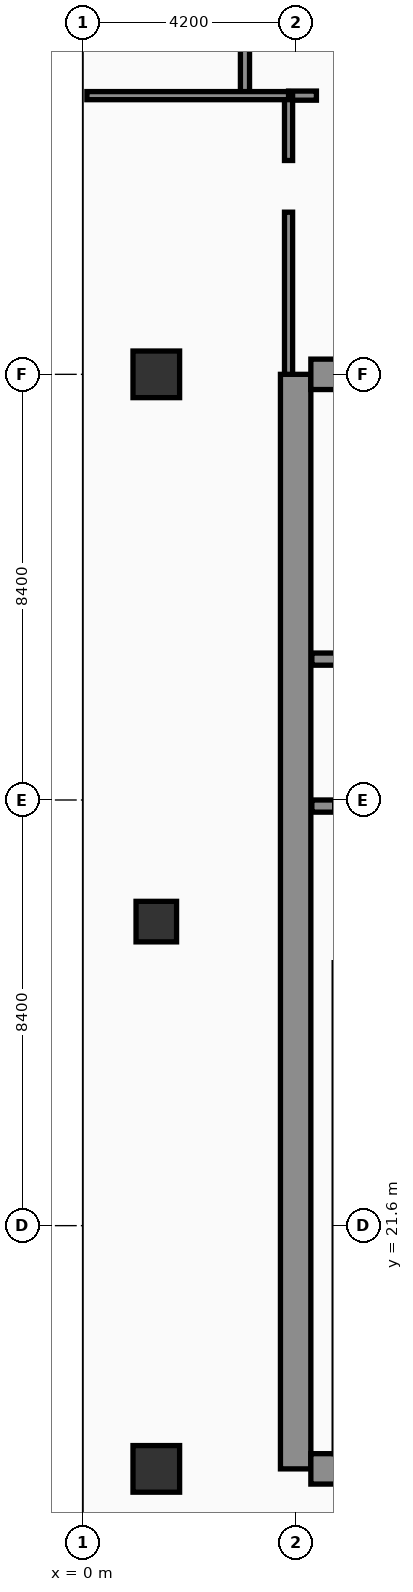
"""IFC4 building model, lengths in metres.
Left out: names, types, materials, properties, quantities, classifications, styles, units other than length and angle.
Written with IfcOpenShell. Run it as: python <this file> out.ifc"""

import sys

from ifc_helpers import new_model, si_unit, direction, frame, frame_2d, origin, origin_2d, place, context, subcontext, project, spatial, rectangle, extrude, element, fill, save


model = new_model("IFC4")
c1 = context("Model", 3, precision=1e-05, world=origin(), true_north=direction((0.0, 1.0)))
c2 = subcontext(c1, "Body", "Model", "MODEL_VIEW")
j1 = project(units=[si_unit("LENGTHUNIT", "METRE"), si_unit("PLANEANGLEUNIT", "RADIAN")], contexts=[c1])
p1 = place(None, origin())
s1 = spatial("IfcSite", under=j1, at=p1, CompositionType="ELEMENT")
p2 = place(p1, origin())
s2 = spatial("IfcBuilding", under=s1, at=p2, CompositionType="ELEMENT")
p3 = place(p2, frame((0.0, 0.0, 311.5)))
s3 = spatial("IfcBuildingStorey", under=s2, at=p3, CompositionType="ELEMENT", Elevation=311.5)
p4 = place(p3, frame((4.2, 16.8, 0.0), z_axis=(0.0, 0.0, 1.0), x_axis=(0.0, 1.0, 0.0)))
e1 = element("IfcWall", 1, at=p4, inside=s3, PredefinedType="SHEAR", context=c2, shape_type="SweptSolid", body=[
    extrude(rectangle(XDim=21.6, YDim=0.6, at=frame_2d((10.8, 0.0))), origin(), (0.0, 0.0, 1.0), 4.26),
])
p5 = place(p3, frame((4.5, 38.4, 0.0), z_axis=(0.0, 0.0, 1.0), x_axis=(1.0, 0.0, 0.0)))
e2 = element("IfcWall", 2, at=p5, inside=s3, PredefinedType="SHEAR", context=c2, shape_type="SweptSolid", body=[
    extrude(rectangle(XDim=10.2, YDim=0.6, at=frame_2d((5.1, 0.0))), origin(), (0.0, 0.0, 1.0), 4.26),
])
p6 = place(p5, frame((5.8, 0.0, 0.0)))
e3 = element("IfcOpeningElement", 3, at=p6, cuts=e2, PredefinedType="OPENING", context=c2, shape_type="SweptSolid", body=[
    extrude(rectangle(XDim=1.1, YDim=2.2, at=frame_2d((0.55, 1.1))), frame((0.0, 0.31, 0.0), z_axis=(0.0, -1.0, 0.0), x_axis=(1.0, 0.0, 0.0)), (0.0, 0.0, 1.0), 0.62),
])
p7 = place(p3, frame((4.5, 16.8, 0.0), z_axis=(0.0, 0.0, 1.0), x_axis=(1.0, 0.0, 0.0)))
e4 = element("IfcWall", 4, at=p7, inside=s3, PredefinedType="SHEAR", context=c2, shape_type="SweptSolid", body=[
    extrude(rectangle(XDim=10.2, YDim=0.6, at=frame_2d((5.1, 0.0))), origin(), (0.0, 0.0, 1.0), 4.26),
])
p8 = place(p3, frame((1.45, 16.8, 0.0), z_axis=(0.0, 0.0, 1.0), x_axis=(1.0, 0.0, 0.0)))
e5 = element("IfcColumn", 5, at=p8, inside=s3, PredefinedType="COLUMN", context=c2, shape_type="SweptSolid", body=[
    extrude(rectangle(XDim=0.92, YDim=0.92, at=origin_2d()), origin(), (0.0, 0.0, 1.0), 4.26),
])
p9 = place(p3, frame((1.45, 27.6, 0.0), z_axis=(0.0, 0.0, 1.0), x_axis=(1.0, 0.0, 0.0)))
e6 = element("IfcColumn", 6, at=p9, inside=s3, PredefinedType="COLUMN", context=c2, shape_type="SweptSolid", body=[
    extrude(rectangle(XDim=0.8, YDim=0.8, at=origin_2d()), origin(), (0.0, 0.0, 1.0), 4.26),
])
p10 = place(p3, frame((1.45, 38.4, 0.0), z_axis=(0.0, 0.0, 1.0), x_axis=(1.0, 0.0, 0.0)))
e7 = element("IfcColumn", 7, at=p10, inside=s3, PredefinedType="COLUMN", context=c2, shape_type="SweptSolid", body=[
    extrude(rectangle(XDim=0.92, YDim=0.92, at=origin_2d()), origin(), (0.0, 0.0, 1.0), 4.26),
])
p11 = place(p3, frame((4.52, 29.88, 0.0), z_axis=(0.0, 0.0, 1.0), x_axis=(1.0, 0.0, 0.0)))
e8 = element("IfcWall", 8, at=p11, inside=s3, PredefinedType="SOLIDWALL", context=c2, shape_type="SweptSolid", body=[
    extrude(rectangle(XDim=4.9, YDim=0.24, at=frame_2d((2.45, 0.0))), origin(), (0.0, 0.0, 1.0), 4.26),
])
p12 = place(p11, frame((0.45, 0.0, 0.0)))
e9 = element("IfcOpeningElement", 9, at=p12, cuts=e8, PredefinedType="OPENING", context=c2, shape_type="SweptSolid", body=[
    extrude(rectangle(XDim=1.3, YDim=2.35, at=frame_2d((0.65, 1.175))), frame((0.0, 0.13, 0.0), z_axis=(0.0, -1.0, 0.0), x_axis=(1.0, 0.0, 0.0)), (0.0, 0.0, 1.0), 0.26),
])
p13 = place(p3, frame((4.52, 32.78, 0.0), z_axis=(0.0, 0.0, 1.0), x_axis=(1.0, 0.0, 0.0)))
e10 = element("IfcWall", 10, at=p13, inside=s3, PredefinedType="SOLIDWALL", context=c2, shape_type="SweptSolid", body=[
    extrude(rectangle(XDim=4.9, YDim=0.24, at=frame_2d((2.45, 0.0))), origin(), (0.0, 0.0, 1.0), 3.89),
])
p14 = place(p3, frame((3.2, 43.9, 0.0), z_axis=(0.0, 0.0, 1.0), x_axis=(0.0, 1.0, 0.0)))
e11 = element("IfcWall", 11, at=p14, inside=s3, PredefinedType="PARTITIONING", context=c2, shape_type="SweptSolid", body=[
    extrude(rectangle(XDim=3.9, YDim=0.18, at=frame_2d((1.95, 0.0))), origin(), (0.0, 0.0, 1.0), 4.26),
])
p15 = place(p3, frame((4.06, 43.9, 0.0), z_axis=(0.0, 0.0, 1.0), x_axis=(1.0, 0.0, 0.0)))
e12 = element("IfcWall", 12, at=p15, inside=s3, PredefinedType="PARTITIONING", context=c2, shape_type="SweptSolid", body=[
    extrude(rectangle(XDim=10.74, YDim=0.18, at=frame_2d((5.37, 0.0))), origin(), (0.0, 0.0, 1.0), 3.69),
])
p16 = place(p15, frame((0.55, 0.0, 0.0)))
e13 = element("IfcOpeningElement", 13, at=p16, cuts=e12, PredefinedType="OPENING", context=c2, shape_type="SweptSolid", body=[
    extrude(rectangle(XDim=1.02, YDim=2.2, at=frame_2d((0.51, 1.1))), frame((0.0, 0.1, 0.0), z_axis=(0.0, -1.0, 0.0), x_axis=(1.0, 0.0, 0.0)), (0.0, 0.0, 1.0), 0.2),
])
p17 = place(p15, frame((4.65, 0.0, 0.0)))
e14 = element("IfcOpeningElement", 14, at=p17, cuts=e12, PredefinedType="OPENING", context=c2, shape_type="SweptSolid", body=[
    extrude(rectangle(XDim=1.02, YDim=2.2, at=frame_2d((0.51, 1.1))), frame((0.0, 0.1, 0.0), z_axis=(0.0, -1.0, 0.0), x_axis=(1.0, 0.0, 0.0)), (0.0, 0.0, 1.0), 0.2),
])
p18 = place(p15, frame((8.4, 0.0, 0.0)))
e15 = element("IfcOpeningElement", 15, at=p18, cuts=e12, PredefinedType="OPENING", context=c2, shape_type="SweptSolid", body=[
    extrude(rectangle(XDim=1.02, YDim=2.2, at=frame_2d((0.51, 1.1))), frame((0.0, 0.1, 0.0), z_axis=(0.0, -1.0, 0.0), x_axis=(1.0, 0.0, 0.0)), (0.0, 0.0, 1.0), 0.2),
])
p19 = place(p3, frame((4.06, 38.4, 0.0), z_axis=(0.0, 0.0, 1.0), x_axis=(0.0, 1.0, 0.0)))
e16 = element("IfcWall", 16, at=p19, inside=s3, PredefinedType="PARTITIONING", context=c2, shape_type="SweptSolid", body=[
    extrude(rectangle(XDim=5.5, YDim=0.16, at=frame_2d((2.75, 0.0))), origin(), (0.0, 0.0, 1.0), 3.69),
])
p20 = place(p19, frame((3.2, 0.0, 0.0)))
e17 = element("IfcOpeningElement", 17, at=p20, cuts=e16, PredefinedType="OPENING", context=c2, shape_type="SweptSolid", body=[
    extrude(rectangle(XDim=1.02, YDim=2.2, at=frame_2d((0.51, 1.1))), frame((0.0, 0.09, 0.0), z_axis=(0.0, -1.0, 0.0), x_axis=(1.0, 0.0, 0.0)), (0.0, 0.0, 1.0), 0.18),
])
p21 = place(p3, frame((0.08, 43.9, 0.0), z_axis=(0.0, 0.0, 1.0), x_axis=(1.0, 0.0, 0.0)))
e18 = element("IfcWall", 18, at=p21, inside=s3, PredefinedType="PARTITIONING", context=c2, shape_type="SweptSolid", body=[
    extrude(rectangle(XDim=3.98, YDim=0.16, at=frame_2d((1.99, 0.0))), origin(), (0.0, 0.0, 1.0), 3.69),
])
p22 = place(p16, origin())
e19 = element("IfcDoor", 19, at=p22, inside=s3, OperationType="SINGLE_SWING_LEFT", PredefinedType="DOOR", context=c2, shape_type="SweptSolid", body=[
    extrude(rectangle(XDim=1.02, YDim=2.2, at=frame_2d((0.51, 1.1))), frame((0.0, 0.025, 0.0), z_axis=(0.0, -1.0, 0.0), x_axis=(1.0, 0.0, 0.0)), (0.0, 0.0, 1.0), 0.05),
])
fill(e13, e19)
p23 = place(p20, origin())
e20 = element("IfcDoor", 20, at=p23, inside=s3, OperationType="SINGLE_SWING_LEFT", PredefinedType="DOOR", context=c2, shape_type="SweptSolid", body=[
    extrude(rectangle(XDim=1.02, YDim=2.2, at=frame_2d((0.51, 1.1))), frame((0.0, 0.025, 0.0), z_axis=(0.0, -1.0, 0.0), x_axis=(1.0, 0.0, 0.0)), (0.0, 0.0, 1.0), 0.05),
])
fill(e17, e20)
save(model, sys.argv[1])
